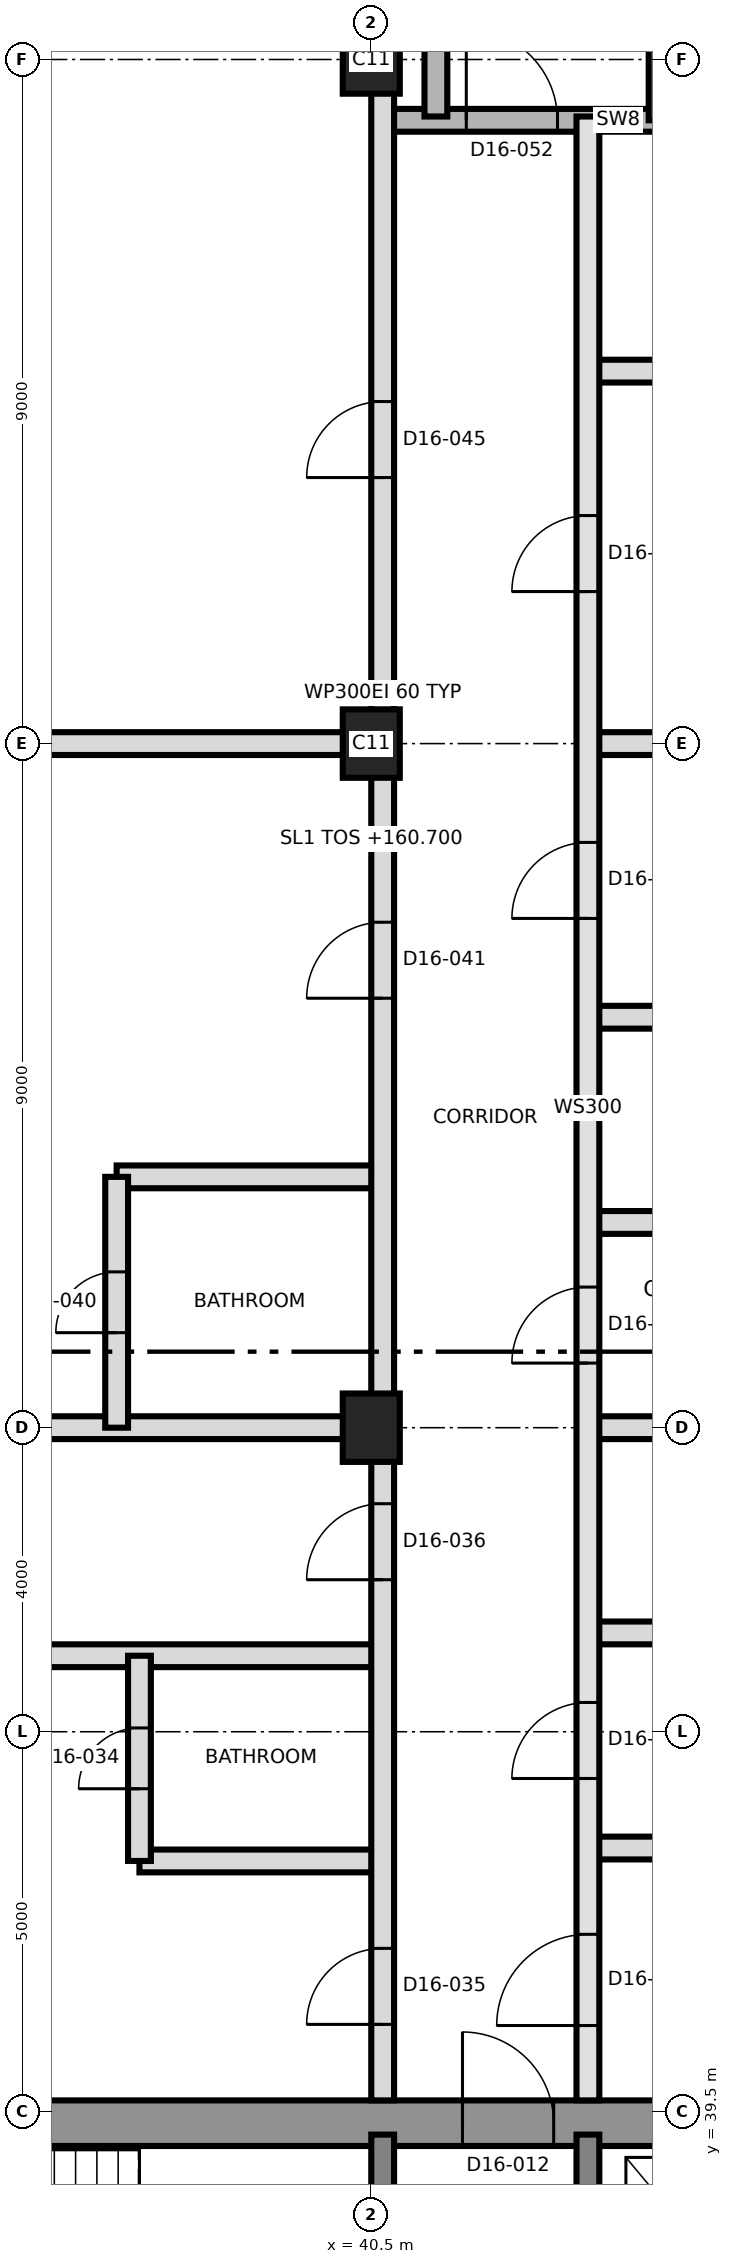
"""IFC4 building model, lengths in metres.
Left out: names, types, materials, properties, quantities, classifications, styles, units other than length and angle.
Written with IfcOpenShell. Run it as: python <this file> out.ifc"""

import sys

from ifc_helpers import new_model, si_unit, direction, frame, frame_2d, origin, origin_2d, place, context, subcontext, project, spatial, rectangle, extrude, element, fill, save


model = new_model("IFC4")
c1 = context("Model", 3, precision=1e-05, world=origin(), true_north=direction((0.0, 1.0)))
c2 = subcontext(c1, "Body", "Model", "MODEL_VIEW")
j1 = project(units=[si_unit("LENGTHUNIT", "METRE"), si_unit("PLANEANGLEUNIT", "RADIAN")], contexts=[c1])
p1 = place(None, origin())
s1 = spatial("IfcSite", under=j1, at=p1, CompositionType="ELEMENT")
p2 = place(p1, origin())
s2 = spatial("IfcBuilding", under=s1, at=p2, CompositionType="ELEMENT")
p3 = place(p2, frame((0.0, 0.0, 160.7)))
s3 = spatial("IfcBuildingStorey", under=s2, at=p3, CompositionType="ELEMENT", Elevation=160.7)
p4 = place(p3, frame((31.2, 39.35, 0.0), z_axis=(0.0, 0.0, 1.0), x_axis=(1.0, 0.0, 0.0)))
e1 = element("IfcWall", 1, at=p4, inside=s3, PredefinedType="SHEAR", context=c2, shape_type="SweptSolid", body=[
    extrude(rectangle(XDim=27.0, YDim=0.6, at=frame_2d((13.5, 0.0))), origin(), (0.0, 0.0, 1.0), 3.7),
])
p5 = place(p4, frame((10.5, 0.0, 0.0)))
e2 = element("IfcOpeningElement", 2, at=p5, cuts=e1, PredefinedType="OPENING", context=c2, shape_type="SweptSolid", body=[
    extrude(rectangle(XDim=1.2, YDim=2.1, at=frame_2d((0.6, 1.05))), frame((0.0, 0.31, 0.0), z_axis=(0.0, -1.0, 0.0), x_axis=(1.0, 0.0, 0.0)), (0.0, 0.0, 1.0), 0.62),
])
for number, where, z_axis, x_axis in (
    (3, (40.65, 33.5, 0.0), (0.0, 0.0, 1.0), (0.0, 1.0, 0.0)),
    (4, (43.35, 33.5, 0.0), (0.0, 0.0, 1.0), (0.0, 1.0, 0.0)),
):
    element("IfcWall", number, at=place(p3, frame(where, z_axis=z_axis, x_axis=x_axis)), inside=s3, PredefinedType="SHEAR", context=c2, shape_type="SweptSolid", body=[
        extrude(rectangle(XDim=5.7, YDim=0.3, at=frame_2d((2.85, 0.0))), origin(), (0.0, 0.0, 1.0), 3.7),
    ])
for number, where, z_axis, x_axis in (
    (5, (40.5, 48.5, 0.0), (0.0, 0.0, 1.0), (0.0, 1.0, 0.0)),
    (6, (40.5, 57.5, 0.0), (0.0, 0.0, 1.0), (0.0, 1.0, 0.0)),
    (7, (40.5, 66.5, 0.0), (0.0, 0.0, 1.0), (0.0, 1.0, 0.0)),
):
    element("IfcColumn", number, at=place(p3, frame(where, z_axis=z_axis, x_axis=x_axis)), inside=s3, PredefinedType="COLUMN", context=c2, shape_type="SweptSolid", body=[
        extrude(rectangle(XDim=0.9, YDim=0.75, at=origin_2d()), origin(), (0.0, 0.0, 1.0), 3.7),
    ])
p6 = place(p3, frame((37.45, 42.8, 0.0), z_axis=(0.0, 0.0, 1.0), x_axis=(1.0, 0.0, 0.0)))
e8 = element("IfcWall", 8, at=p6, inside=s3, PredefinedType="PARTITIONING", context=c2, shape_type="SweptSolid", body=[
    extrude(rectangle(XDim=3.2, YDim=0.3, at=frame_2d((1.6, 0.0))), origin(), (0.0, 0.0, 1.0), 3.4),
])
p7 = place(p3, frame((43.35, 42.97, 0.0), z_axis=(0.0, 0.0, 1.0), x_axis=(1.0, 0.0, 0.0)))
e9 = element("IfcWall", 9, at=p7, inside=s3, PredefinedType="PARTITIONING", context=c2, shape_type="SweptSolid", body=[
    extrude(rectangle(XDim=8.149, YDim=0.3, at=frame_2d((4.074, 0.0))), origin(), (0.0, 0.0, 1.0), 3.4),
])
p8 = place(p3, frame((30.565, 45.5, 0.0), z_axis=(0.0, 0.0, 1.0), x_axis=(1.0, 0.0, 0.0)))
e10 = element("IfcWall", 10, at=p8, inside=s3, PredefinedType="PARTITIONING", context=c2, shape_type="SweptSolid", body=[
    extrude(rectangle(XDim=10.085, YDim=0.3, at=frame_2d((5.042, 0.0))), origin(), (0.0, 0.0, 1.0), 3.4),
])
p9 = place(p3, frame((43.35, 45.8, 0.0), z_axis=(0.0, 0.0, 1.0), x_axis=(1.0, 0.0, 0.0)))
e11 = element("IfcWall", 11, at=p9, inside=s3, PredefinedType="PARTITIONING", context=c2, shape_type="SweptSolid", body=[
    extrude(rectangle(XDim=3.2, YDim=0.3, at=frame_2d((1.6, 0.0))), origin(), (0.0, 0.0, 1.0), 3.4),
])
p10 = place(p3, frame((30.565, 48.5, 0.0), z_axis=(0.0, 0.0, 1.0), x_axis=(1.0, 0.0, 0.0)))
e12 = element("IfcWall", 12, at=p10, inside=s3, PredefinedType="PARTITIONING", context=c2, shape_type="SweptSolid", body=[
    extrude(rectangle(XDim=10.085, YDim=0.3, at=frame_2d((5.042, 0.0))), origin(), (0.0, 0.0, 1.0), 3.4),
])
p11 = place(p3, frame((43.35, 48.5, 0.0), z_axis=(0.0, 0.0, 1.0), x_axis=(1.0, 0.0, 0.0)))
e13 = element("IfcWall", 13, at=p11, inside=s3, PredefinedType="PARTITIONING", context=c2, shape_type="SweptSolid", body=[
    extrude(rectangle(XDim=7.265, YDim=0.3, at=frame_2d((3.632, 0.0))), origin(), (0.0, 0.0, 1.0), 3.4),
])
p12 = place(p3, frame((43.35, 51.2, 0.0), z_axis=(0.0, 0.0, 1.0), x_axis=(1.0, 0.0, 0.0)))
e14 = element("IfcWall", 14, at=p12, inside=s3, PredefinedType="PARTITIONING", context=c2, shape_type="SweptSolid", body=[
    extrude(rectangle(XDim=3.2, YDim=0.3, at=frame_2d((1.6, 0.0))), origin(), (0.0, 0.0, 1.0), 3.4),
])
p13 = place(p3, frame((37.15, 51.8, 0.0), z_axis=(0.0, 0.0, 1.0), x_axis=(1.0, 0.0, 0.0)))
e15 = element("IfcWall", 15, at=p13, inside=s3, PredefinedType="PARTITIONING", context=c2, shape_type="SweptSolid", body=[
    extrude(rectangle(XDim=3.5, YDim=0.3, at=frame_2d((1.75, 0.0))), origin(), (0.0, 0.0, 1.0), 3.4),
])
p14 = place(p3, frame((43.35, 53.9, 0.0), z_axis=(0.0, 0.0, 1.0), x_axis=(1.0, 0.0, 0.0)))
e16 = element("IfcWall", 16, at=p14, inside=s3, PredefinedType="PARTITIONING", context=c2, shape_type="SweptSolid", body=[
    extrude(rectangle(XDim=7.265, YDim=0.3, at=frame_2d((3.632, 0.0))), origin(), (0.0, 0.0, 1.0), 3.4),
])
p15 = place(p3, frame((30.565, 57.5, 0.0), z_axis=(0.0, 0.0, 1.0), x_axis=(1.0, 0.0, 0.0)))
e17 = element("IfcWall", 17, at=p15, inside=s3, PredefinedType="PARTITIONING", context=c2, shape_type="SweptSolid", body=[
    extrude(rectangle(XDim=10.085, YDim=0.3, at=frame_2d((5.042, 0.0))), origin(), (0.0, 0.0, 1.0), 3.4),
])
p16 = place(p3, frame((43.35, 57.5, 0.0), z_axis=(0.0, 0.0, 1.0), x_axis=(1.0, 0.0, 0.0)))
e18 = element("IfcWall", 18, at=p16, inside=s3, PredefinedType="PARTITIONING", context=c2, shape_type="SweptSolid", body=[
    extrude(rectangle(XDim=7.265, YDim=0.3, at=frame_2d((3.632, 0.0))), origin(), (0.0, 0.0, 1.0), 3.4),
])
p17 = place(p3, frame((43.35, 62.4, 0.0), z_axis=(0.0, 0.0, 1.0), x_axis=(1.0, 0.0, 0.0)))
e19 = element("IfcWall", 19, at=p17, inside=s3, PredefinedType="PARTITIONING", context=c2, shape_type="SweptSolid", body=[
    extrude(rectangle(XDim=7.265, YDim=0.3, at=frame_2d((3.632, 0.0))), origin(), (0.0, 0.0, 1.0), 3.4),
])
p18 = place(p17, frame((4.65, 0.0, 0.0)))
e20 = element("IfcOpeningElement", 20, at=p18, cuts=e19, PredefinedType="OPENING", context=c2, shape_type="SweptSolid", body=[
    extrude(rectangle(XDim=1.0, YDim=2.1, at=frame_2d((0.5, 1.05))), frame((0.0, 0.16, 0.0), z_axis=(0.0, -1.0, 0.0), x_axis=(1.0, 0.0, 0.0)), (0.0, 0.0, 1.0), 0.32),
])
p19 = place(p3, frame((40.65, 65.7, 0.0), z_axis=(0.0, 0.0, 1.0), x_axis=(1.0, 0.0, 0.0)))
e21 = element("IfcWall", 21, at=p19, inside=s3, PredefinedType="SHEAR", context=c2, shape_type="SweptSolid", body=[
    extrude(rectangle(XDim=6.2, YDim=0.3, at=frame_2d((3.1, 0.0))), origin(), (0.0, 0.0, 1.0), 3.4),
])
p20 = place(p19, frame((1.1, 0.0, 0.0)))
e22 = element("IfcOpeningElement", 22, at=p20, cuts=e21, PredefinedType="OPENING", context=c2, shape_type="SweptSolid", body=[
    extrude(rectangle(XDim=1.2, YDim=2.1, at=frame_2d((0.6, 1.05))), frame((0.0, 0.16, 0.0), z_axis=(0.0, -1.0, 0.0), x_axis=(1.0, 0.0, 0.0)), (0.0, 0.0, 1.0), 0.32),
])
p21 = place(p3, frame((37.15, 48.5, 0.0), z_axis=(0.0, 0.0, 1.0), x_axis=(0.0, 1.0, 0.0)))
e23 = element("IfcWall", 23, at=p21, inside=s3, PredefinedType="PARTITIONING", context=c2, shape_type="SweptSolid", body=[
    extrude(rectangle(XDim=3.3, YDim=0.3, at=frame_2d((1.65, 0.0))), origin(), (0.0, 0.0, 1.0), 3.4),
])
p22 = place(p21, frame((1.25, 0.0, 0.0)))
e24 = element("IfcOpeningElement", 24, at=p22, cuts=e23, PredefinedType="OPENING", context=c2, shape_type="SweptSolid", body=[
    extrude(rectangle(XDim=0.8, YDim=2.1, at=frame_2d((0.4, 1.05))), frame((0.0, 0.16, 0.0), z_axis=(0.0, -1.0, 0.0), x_axis=(1.0, 0.0, 0.0)), (0.0, 0.0, 1.0), 0.32),
])
p23 = place(p3, frame((37.45, 42.8, 0.0), z_axis=(0.0, 0.0, 1.0), x_axis=(0.0, 1.0, 0.0)))
e25 = element("IfcWall", 25, at=p23, inside=s3, PredefinedType="PARTITIONING", context=c2, shape_type="SweptSolid", body=[
    extrude(rectangle(XDim=2.7, YDim=0.3, at=frame_2d((1.35, 0.0))), origin(), (0.0, 0.0, 1.0), 3.4),
])
p24 = place(p23, frame((0.95, 0.0, 0.0)))
e26 = element("IfcOpeningElement", 26, at=p24, cuts=e25, PredefinedType="OPENING", context=c2, shape_type="SweptSolid", body=[
    extrude(rectangle(XDim=0.8, YDim=2.1, at=frame_2d((0.4, 1.05))), frame((0.0, 0.16, 0.0), z_axis=(0.0, -1.0, 0.0), x_axis=(1.0, 0.0, 0.0)), (0.0, 0.0, 1.0), 0.32),
])
p25 = place(p3, frame((40.65, 39.65, 0.0), z_axis=(0.0, 0.0, 1.0), x_axis=(0.0, 1.0, 0.0)))
e27 = element("IfcWall", 27, at=p25, inside=s3, PredefinedType="PARTITIONING", context=c2, shape_type="SweptSolid", body=[
    extrude(rectangle(XDim=37.025, YDim=0.3, at=frame_2d((18.513, 0.0))), origin(), (0.0, 0.0, 1.0), 3.4),
])
p26 = place(p25, frame((1.0, 0.0, 0.0)))
e28 = element("IfcOpeningElement", 28, at=p26, cuts=e27, PredefinedType="OPENING", context=c2, shape_type="SweptSolid", body=[
    extrude(rectangle(XDim=1.0, YDim=2.1, at=frame_2d((0.5, 1.05))), frame((0.0, 0.16, 0.0), z_axis=(0.0, -1.0, 0.0), x_axis=(1.0, 0.0, 0.0)), (0.0, 0.0, 1.0), 0.32),
])
p27 = place(p25, frame((6.85, 0.0, 0.0)))
e29 = element("IfcOpeningElement", 29, at=p27, cuts=e27, PredefinedType="OPENING", context=c2, shape_type="SweptSolid", body=[
    extrude(rectangle(XDim=1.0, YDim=2.1, at=frame_2d((0.5, 1.05))), frame((0.0, 0.16, 0.0), z_axis=(0.0, -1.0, 0.0), x_axis=(1.0, 0.0, 0.0)), (0.0, 0.0, 1.0), 0.32),
])
p28 = place(p25, frame((14.5, 0.0, 0.0)))
e30 = element("IfcOpeningElement", 30, at=p28, cuts=e27, PredefinedType="OPENING", context=c2, shape_type="SweptSolid", body=[
    extrude(rectangle(XDim=1.0, YDim=2.4, at=frame_2d((0.5, 1.2))), frame((0.0, 0.16, 0.0), z_axis=(0.0, -1.0, 0.0), x_axis=(1.0, 0.0, 0.0)), (0.0, 0.0, 1.0), 0.32),
])
p29 = place(p25, frame((21.35, 0.0, 0.0)))
e31 = element("IfcOpeningElement", 31, at=p29, cuts=e27, PredefinedType="OPENING", context=c2, shape_type="SweptSolid", body=[
    extrude(rectangle(XDim=1.0, YDim=2.4, at=frame_2d((0.5, 1.2))), frame((0.0, 0.16, 0.0), z_axis=(0.0, -1.0, 0.0), x_axis=(1.0, 0.0, 0.0)), (0.0, 0.0, 1.0), 0.32),
])
p30 = place(p3, frame((41.35, 65.75, 0.0), z_axis=(0.0, 0.0, 1.0), x_axis=(0.0, 1.0, 0.0)))
e32 = element("IfcWall", 32, at=p30, inside=s3, PredefinedType="SHEAR", context=c2, shape_type="SweptSolid", body=[
    extrude(rectangle(XDim=8.85, YDim=0.3, at=frame_2d((4.425, 0.0))), origin(), (0.0, 0.0, 1.0), 3.4),
])
p31 = place(p3, frame((43.35, 39.65, 0.0), z_axis=(0.0, 0.0, 1.0), x_axis=(0.0, 1.0, 0.0)))
e33 = element("IfcWall", 33, at=p31, inside=s3, PredefinedType="SOLIDWALL", context=c2, shape_type="SweptSolid", body=[
    extrude(rectangle(XDim=26.1, YDim=0.3, at=frame_2d((13.05, 0.0))), origin(), (0.0, 0.0, 1.0), 3.4),
])
p32 = place(p31, frame((0.985, 0.0, 0.0)))
e34 = element("IfcOpeningElement", 34, at=p32, cuts=e33, PredefinedType="OPENING", context=c2, shape_type="SweptSolid", body=[
    extrude(rectangle(XDim=1.2, YDim=2.1, at=frame_2d((0.6, 1.05))), frame((0.0, 0.16, 0.0), z_axis=(0.0, -1.0, 0.0), x_axis=(1.0, 0.0, 0.0)), (0.0, 0.0, 1.0), 0.32),
])
p33 = place(p31, frame((4.235, 0.0, 0.0)))
e35 = element("IfcOpeningElement", 35, at=p33, cuts=e33, PredefinedType="OPENING", context=c2, shape_type="SweptSolid", body=[
    extrude(rectangle(XDim=1.0, YDim=2.1, at=frame_2d((0.5, 1.05))), frame((0.0, 0.16, 0.0), z_axis=(0.0, -1.0, 0.0), x_axis=(1.0, 0.0, 0.0)), (0.0, 0.0, 1.0), 0.32),
])
p34 = place(p31, frame((9.7, 0.0, 0.0)))
e36 = element("IfcOpeningElement", 36, at=p34, cuts=e33, PredefinedType="OPENING", context=c2, shape_type="SweptSolid", body=[
    extrude(rectangle(XDim=1.0, YDim=2.1, at=frame_2d((0.5, 1.05))), frame((0.0, 0.16, 0.0), z_axis=(0.0, -1.0, 0.0), x_axis=(1.0, 0.0, 0.0)), (0.0, 0.0, 1.0), 0.32),
])
p35 = place(p31, frame((15.55, 0.0, 0.0)))
e37 = element("IfcOpeningElement", 37, at=p35, cuts=e33, PredefinedType="OPENING", context=c2, shape_type="SweptSolid", body=[
    extrude(rectangle(XDim=1.0, YDim=2.1, at=frame_2d((0.5, 1.05))), frame((0.0, 0.16, 0.0), z_axis=(0.0, -1.0, 0.0), x_axis=(1.0, 0.0, 0.0)), (0.0, 0.0, 1.0), 0.32),
])
p36 = place(p31, frame((19.85, 0.0, 0.0)))
e38 = element("IfcOpeningElement", 38, at=p36, cuts=e33, PredefinedType="OPENING", context=c2, shape_type="SweptSolid", body=[
    extrude(rectangle(XDim=1.0, YDim=2.4, at=frame_2d((0.5, 1.2))), frame((0.0, 0.16, 0.0), z_axis=(0.0, -1.0, 0.0), x_axis=(1.0, 0.0, 0.0)), (0.0, 0.0, 1.0), 0.32),
])
p37 = place(p3, frame((44.3, 65.7, 0.0), z_axis=(0.0, 0.0, 1.0), x_axis=(0.0, 1.0, 0.0)))
e39 = element("IfcWall", 39, at=p37, inside=s3, PredefinedType="SHEAR", context=c2, shape_type="SweptSolid", body=[
    extrude(rectangle(XDim=8.9, YDim=0.3, at=frame_2d((4.45, 0.0))), origin(), (0.0, 0.0, 1.0), 3.4),
])
p38 = place(p5, origin())
e40 = element("IfcDoor", 40, at=p38, inside=s3, OperationType="SINGLE_SWING_RIGHT", PredefinedType="DOOR", context=c2, shape_type="SweptSolid", body=[
    extrude(rectangle(XDim=1.2, YDim=2.1, at=frame_2d((0.6, 1.05))), frame((0.0, 0.025, 0.0), z_axis=(0.0, -1.0, 0.0), x_axis=(1.0, 0.0, 0.0)), (0.0, 0.0, 1.0), 0.05),
])
fill(e2, e40)
p39 = place(p32, origin())
e41 = element("IfcDoor", 41, at=p39, inside=s3, OperationType="SINGLE_SWING_RIGHT", PredefinedType="DOOR", context=c2, shape_type="SweptSolid", body=[
    extrude(rectangle(XDim=1.2, YDim=2.1, at=frame_2d((0.6, 1.05))), frame((0.0, 0.025, 0.0), z_axis=(0.0, -1.0, 0.0), x_axis=(1.0, 0.0, 0.0)), (0.0, 0.0, 1.0), 0.05),
])
fill(e34, e41)
p40 = place(p33, origin())
e42 = element("IfcDoor", 42, at=p40, inside=s3, OperationType="SINGLE_SWING_LEFT", PredefinedType="DOOR", context=c2, shape_type="SweptSolid", body=[
    extrude(rectangle(XDim=1.0, YDim=2.1, at=frame_2d((0.5, 1.05))), frame((0.0, 0.025, 0.0), z_axis=(0.0, -1.0, 0.0), x_axis=(1.0, 0.0, 0.0)), (0.0, 0.0, 1.0), 0.05),
])
fill(e35, e42)
p41 = place(p24, origin())
e43 = element("IfcDoor", 43, at=p41, inside=s3, OperationType="SINGLE_SWING_LEFT", PredefinedType="DOOR", context=c2, shape_type="SweptSolid", body=[
    extrude(rectangle(XDim=0.8, YDim=2.1, at=frame_2d((0.4, 1.05))), frame((0.0, 0.025, 0.0), z_axis=(0.0, -1.0, 0.0), x_axis=(1.0, 0.0, 0.0)), (0.0, 0.0, 1.0), 0.05),
])
fill(e26, e43)
p42 = place(p26, origin())
e44 = element("IfcDoor", 44, at=p42, inside=s3, OperationType="SINGLE_SWING_RIGHT", PredefinedType="DOOR", context=c2, shape_type="SweptSolid", body=[
    extrude(rectangle(XDim=1.0, YDim=2.1, at=frame_2d((0.5, 1.05))), frame((0.0, 0.025, 0.0), z_axis=(0.0, -1.0, 0.0), x_axis=(1.0, 0.0, 0.0)), (0.0, 0.0, 1.0), 0.05),
])
fill(e28, e44)
p43 = place(p27, origin())
e45 = element("IfcDoor", 45, at=p43, inside=s3, OperationType="SINGLE_SWING_LEFT", PredefinedType="DOOR", context=c2, shape_type="SweptSolid", body=[
    extrude(rectangle(XDim=1.0, YDim=2.1, at=frame_2d((0.5, 1.05))), frame((0.0, 0.025, 0.0), z_axis=(0.0, -1.0, 0.0), x_axis=(1.0, 0.0, 0.0)), (0.0, 0.0, 1.0), 0.05),
])
fill(e29, e45)
p44 = place(p34, origin())
e46 = element("IfcDoor", 46, at=p44, inside=s3, OperationType="SINGLE_SWING_RIGHT", PredefinedType="DOOR", context=c2, shape_type="SweptSolid", body=[
    extrude(rectangle(XDim=1.0, YDim=2.1, at=frame_2d((0.5, 1.05))), frame((0.0, 0.025, 0.0), z_axis=(0.0, -1.0, 0.0), x_axis=(1.0, 0.0, 0.0)), (0.0, 0.0, 1.0), 0.05),
])
fill(e36, e46)
p45 = place(p35, origin())
e47 = element("IfcDoor", 47, at=p45, inside=s3, OperationType="SINGLE_SWING_LEFT", PredefinedType="DOOR", context=c2, shape_type="SweptSolid", body=[
    extrude(rectangle(XDim=1.0, YDim=2.1, at=frame_2d((0.5, 1.05))), frame((0.0, 0.025, 0.0), z_axis=(0.0, -1.0, 0.0), x_axis=(1.0, 0.0, 0.0)), (0.0, 0.0, 1.0), 0.05),
])
fill(e37, e47)
p46 = place(p22, origin())
e48 = element("IfcDoor", 48, at=p46, inside=s3, OperationType="SINGLE_SWING_LEFT", PredefinedType="DOOR", context=c2, shape_type="SweptSolid", body=[
    extrude(rectangle(XDim=0.8, YDim=2.1, at=frame_2d((0.4, 1.05))), frame((0.0, 0.025, 0.0), z_axis=(0.0, -1.0, 0.0), x_axis=(1.0, 0.0, 0.0)), (0.0, 0.0, 1.0), 0.05),
])
fill(e24, e48)
p47 = place(p28, origin())
e49 = element("IfcDoor", 49, at=p47, inside=s3, OperationType="SINGLE_SWING_RIGHT", PredefinedType="DOOR", context=c2, shape_type="SweptSolid", body=[
    extrude(rectangle(XDim=1.0, YDim=2.4, at=frame_2d((0.5, 1.2))), frame((0.0, 0.025, 0.0), z_axis=(0.0, -1.0, 0.0), x_axis=(1.0, 0.0, 0.0)), (0.0, 0.0, 1.0), 0.05),
])
fill(e30, e49)
p48 = place(p36, origin())
e50 = element("IfcDoor", 50, at=p48, inside=s3, OperationType="SINGLE_SWING_LEFT", PredefinedType="DOOR", context=c2, shape_type="SweptSolid", body=[
    extrude(rectangle(XDim=1.0, YDim=2.4, at=frame_2d((0.5, 1.2))), frame((0.0, 0.025, 0.0), z_axis=(0.0, -1.0, 0.0), x_axis=(1.0, 0.0, 0.0)), (0.0, 0.0, 1.0), 0.05),
])
fill(e38, e50)
p49 = place(p29, origin())
e51 = element("IfcDoor", 51, at=p49, inside=s3, OperationType="SINGLE_SWING_LEFT", PredefinedType="DOOR", context=c2, shape_type="SweptSolid", body=[
    extrude(rectangle(XDim=1.0, YDim=2.4, at=frame_2d((0.5, 1.2))), frame((0.0, 0.025, 0.0), z_axis=(0.0, -1.0, 0.0), x_axis=(1.0, 0.0, 0.0)), (0.0, 0.0, 1.0), 0.05),
])
fill(e31, e51)
p50 = place(p20, origin())
e52 = element("IfcDoor", 52, at=p50, inside=s3, OperationType="SINGLE_SWING_RIGHT", PredefinedType="DOOR", context=c2, shape_type="SweptSolid", body=[
    extrude(rectangle(XDim=1.2, YDim=2.1, at=frame_2d((0.6, 1.05))), frame((0.0, 0.025, 0.0), z_axis=(0.0, -1.0, 0.0), x_axis=(1.0, 0.0, 0.0)), (0.0, 0.0, 1.0), 0.05),
])
fill(e22, e52)
save(model, sys.argv[1])
